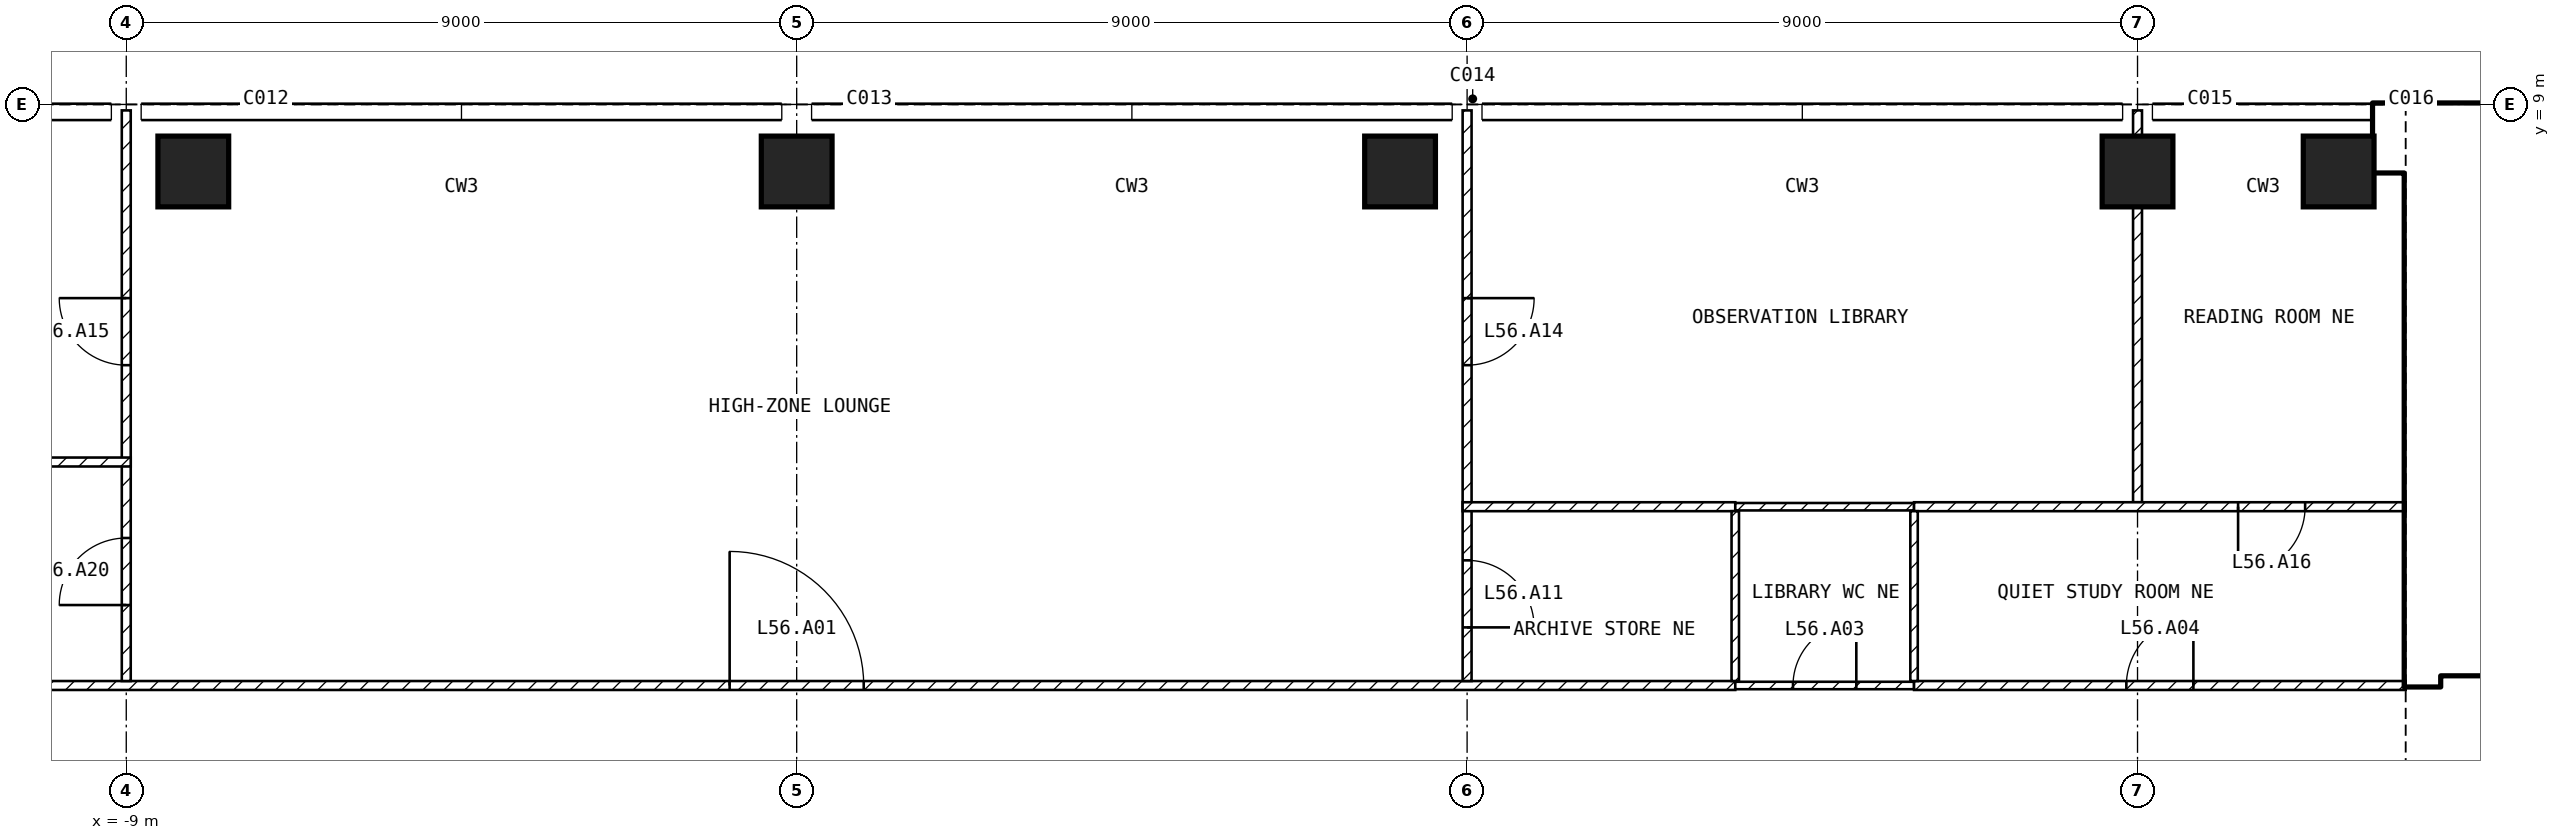
"""IFC4 building model, lengths in metres.
Left out: names, types, materials, properties, quantities, classifications, styles, units other than length and angle.
Written with IfcOpenShell. Run it as: python <this file> out.ifc"""

import sys

from ifc_helpers import new_model, si_unit, direction, frame, frame_2d, origin, origin_2d, place, context, subcontext, project, spatial, rectangle, extrude, element, fill, save


model = new_model("IFC4")
c1 = context("Model", 3, precision=1e-05, world=origin(), true_north=direction((0.0, 1.0)))
c2 = subcontext(c1, "Body", "Model", "MODEL_VIEW")
j1 = project(units=[si_unit("LENGTHUNIT", "METRE"), si_unit("PLANEANGLEUNIT", "RADIAN")], contexts=[c1])
p1 = place(None, origin())
s1 = spatial("IfcSite", under=j1, at=p1, CompositionType="ELEMENT")
p2 = place(p1, origin())
s2 = spatial("IfcBuilding", under=s1, at=p2, CompositionType="ELEMENT")
p3 = place(p2, frame((0.0, 0.0, 222.6)))
s3 = spatial("IfcBuildingStorey", under=s2, at=p3, CompositionType="ELEMENT", Elevation=222.6)
for number, where, z_axis, x_axis in (
    (1, (-8.1, 8.1, -0.3), (0.0, 0.0, 1.0), (1.0, 0.0, 0.0)),
    (2, (0.0, 8.1, -0.3), (0.0, 0.0, 1.0), (1.0, 0.0, 0.0)),
    (3, (8.1, 8.1, -0.3), (0.0, 0.0, 1.0), (1.0, 0.0, 0.0)),
    (4, (18.0, 8.1, -0.3), (0.0, 0.0, 1.0), (1.0, 0.0, 0.0)),
    (5, (20.7, 8.1, -0.3), (0.0, 0.0, 1.0), (1.0, 0.0, 0.0)),
):
    element("IfcColumn", number, at=place(p3, frame(where, z_axis=z_axis, x_axis=x_axis)), inside=s3, PredefinedType="COLUMN", context=c2, shape_type="SweptSolid", body=[
        extrude(rectangle(XDim=0.95, YDim=0.95, at=origin_2d()), origin(), (0.0, 0.0, 1.0), 5.25),
    ])
p4 = place(p3, frame((21.175, 8.55, 0.0), z_axis=(0.0, 0.0, 1.0), x_axis=(1.0, 0.0, 0.0)))
e6 = element("IfcWall", 6, at=p4, inside=s3, PredefinedType="SHEAR", context=c2, shape_type="SweptSolid", body=[
    extrude(rectangle(XDim=8.425, YDim=0.9, at=frame_2d((4.212, 0.0))), origin(), (0.0, 0.0, 1.0), 4.95),
])
p5 = place(p3, frame((21.825, 1.2, 0.0), z_axis=(0.0, 0.0, 1.0), x_axis=(0.0, 1.0, 0.0)))
e7 = element("IfcWall", 7, at=p5, inside=s3, PredefinedType="SHEAR", context=c2, shape_type="SweptSolid", body=[
    extrude(rectangle(XDim=6.9, YDim=0.45, at=frame_2d((3.45, 0.0))), origin(), (0.0, 0.0, 1.0), 4.95),
])
p6 = place(p3, frame((22.05, 1.45, 0.0), z_axis=(0.0, 0.0, 1.0), x_axis=(1.0, 0.0, 0.0)))
e8 = element("IfcWall", 8, at=p6, inside=s3, PredefinedType="SOLIDWALL", context=c2, shape_type="SweptSolid", body=[
    extrude(rectangle(XDim=11.15, YDim=0.2, at=frame_2d((5.575, 0.0))), origin(), (0.0, 0.0, 1.0), 4.95),
])
p7 = place(p6, frame((0.75, 0.0, 0.0)))
e9 = element("IfcOpeningElement", 9, at=p7, cuts=e8, PredefinedType="OPENING", context=c2, shape_type="SweptSolid", body=[
    extrude(rectangle(XDim=1.0, YDim=2.1, at=frame_2d((0.5, 1.05))), frame((0.0, 0.11, 0.0), z_axis=(0.0, -1.0, 0.0), x_axis=(1.0, 0.0, 0.0)), (0.0, 0.0, 1.0), 0.22),
])
p8 = place(p6, frame((3.25, 0.0, 0.0)))
e10 = element("IfcOpeningElement", 10, at=p8, cuts=e8, PredefinedType="OPENING", context=c2, shape_type="SweptSolid", body=[
    extrude(rectangle(XDim=1.0, YDim=2.1, at=frame_2d((0.5, 1.05))), frame((0.0, 0.11, 0.0), z_axis=(0.0, -1.0, 0.0), x_axis=(1.0, 0.0, 0.0)), (0.0, 0.0, 1.0), 0.22),
])
p9 = place(p6, frame((9.15, 0.0, 0.0)))
e11 = element("IfcOpeningElement", 11, at=p9, cuts=e8, PredefinedType="OPENING", context=c2, shape_type="SweptSolid", body=[
    extrude(rectangle(XDim=0.9, YDim=2.1, at=frame_2d((0.45, 1.05))), frame((0.0, 0.11, 0.0), z_axis=(0.0, -1.0, 0.0), x_axis=(1.0, 0.0, 0.0)), (0.0, 0.0, 1.0), 0.22),
])
p10 = place(p3, frame((22.05, 5.15, 0.0), z_axis=(0.0, 0.0, 1.0), x_axis=(1.0, 0.0, 0.0)))
e12 = element("IfcWall", 12, at=p10, inside=s3, PredefinedType="SOLIDWALL", context=c2, shape_type="SweptSolid", body=[
    extrude(rectangle(XDim=6.3, YDim=0.2, at=frame_2d((3.15, 0.0))), origin(), (0.0, 0.0, 1.0), 4.95),
])
p11 = place(p10, frame((0.2, 0.0, 0.0)))
e13 = element("IfcOpeningElement", 13, at=p11, cuts=e12, PredefinedType="OPENING", context=c2, shape_type="SweptSolid", body=[
    extrude(rectangle(XDim=1.0, YDim=2.1, at=frame_2d((0.5, 1.05))), frame((0.0, 0.11, 0.0), z_axis=(0.0, -1.0, 0.0), x_axis=(1.0, 0.0, 0.0)), (0.0, 0.0, 1.0), 0.22),
])
p12 = place(p3, frame((-18.0, 1.2, 0.0), z_axis=(0.0, 0.0, 1.0), x_axis=(1.0, 0.0, 0.0)))
e14 = element("IfcWall", 14, at=p12, inside=s3, PredefinedType="PARTITIONING", context=c2, shape_type="SweptSolid", body=[
    extrude(rectangle(XDim=30.6, YDim=0.12, at=frame_2d((15.3, 0.0))), origin(), (0.0, 0.0, 1.0), 4.95),
])
p13 = place(p12, frame((17.1, 0.0, 0.0)))
e15 = element("IfcOpeningElement", 15, at=p13, cuts=e14, PredefinedType="OPENING", context=c2, shape_type="SweptSolid", body=[
    extrude(rectangle(XDim=1.8, YDim=2.1, at=frame_2d((0.9, 1.05))), frame((0.0, 0.07, 0.0), z_axis=(0.0, -1.0, 0.0), x_axis=(1.0, 0.0, 0.0)), (0.0, 0.0, 1.0), 0.14),
])
p14 = place(p12, frame((1.35, 0.0, 0.0)))
e16 = element("IfcOpeningElement", 16, at=p14, cuts=e14, PredefinedType="OPENING", context=c2, shape_type="SweptSolid", body=[
    extrude(rectangle(XDim=0.9, YDim=2.1, at=frame_2d((0.45, 1.05))), frame((0.0, 0.07, 0.0), z_axis=(0.0, -1.0, 0.0), x_axis=(1.0, 0.0, 0.0)), (0.0, 0.0, 1.0), 0.14),
])
p15 = place(p3, frame((12.6, 1.2, 0.0), z_axis=(0.0, 0.0, 1.0), x_axis=(1.0, 0.0, 0.0)))
e17 = element("IfcWall", 17, at=p15, inside=s3, PredefinedType="PARTITIONING", context=c2, shape_type="SweptSolid", body=[
    extrude(rectangle(XDim=2.4, YDim=0.1, at=frame_2d((1.2, 0.0))), origin(), (0.0, 0.0, 1.0), 4.95),
])
p16 = place(p15, frame((0.775, 0.0, 0.0)))
e18 = element("IfcOpeningElement", 18, at=p16, cuts=e17, PredefinedType="OPENING", context=c2, shape_type="SweptSolid", body=[
    extrude(rectangle(XDim=0.85, YDim=2.1, at=frame_2d((0.425, 1.05))), frame((0.0, 0.06, 0.0), z_axis=(0.0, -1.0, 0.0), x_axis=(1.0, 0.0, 0.0)), (0.0, 0.0, 1.0), 0.12),
])
p17 = place(p3, frame((15.0, 1.2, 0.0), z_axis=(0.0, 0.0, 1.0), x_axis=(1.0, 0.0, 0.0)))
e19 = element("IfcWall", 19, at=p17, inside=s3, PredefinedType="PARTITIONING", context=c2, shape_type="SweptSolid", body=[
    extrude(rectangle(XDim=6.6, YDim=0.12, at=frame_2d((3.3, 0.0))), origin(), (0.0, 0.0, 1.0), 4.95),
])
p18 = place(p17, frame((2.85, 0.0, 0.0)))
e20 = element("IfcOpeningElement", 20, at=p18, cuts=e19, PredefinedType="OPENING", context=c2, shape_type="SweptSolid", body=[
    extrude(rectangle(XDim=0.9, YDim=2.1, at=frame_2d((0.45, 1.05))), frame((0.0, 0.07, 0.0), z_axis=(0.0, -1.0, 0.0), x_axis=(1.0, 0.0, 0.0)), (0.0, 0.0, 1.0), 0.14),
])
p19 = place(p3, frame((9.0, 8.92, 0.0), z_axis=(0.0, 0.0, 1.0), x_axis=(0.0, -1.0, 0.0)))
e21 = element("IfcWall", 21, at=p19, inside=s3, PredefinedType="PARTITIONING", context=c2, shape_type="SweptSolid", body=[
    extrude(rectangle(XDim=7.66, YDim=0.12, at=frame_2d((3.83, 0.0))), origin(), (0.0, 0.0, 1.0), 4.95),
])
p20 = place(p19, frame((6.04, 0.0, 0.0)))
e22 = element("IfcOpeningElement", 22, at=p20, cuts=e21, PredefinedType="OPENING", context=c2, shape_type="SweptSolid", body=[
    extrude(rectangle(XDim=0.9, YDim=2.1, at=frame_2d((0.45, 1.05))), frame((0.0, 0.07, 0.0), z_axis=(0.0, -1.0, 0.0), x_axis=(1.0, 0.0, 0.0)), (0.0, 0.0, 1.0), 0.14),
])
p21 = place(p19, frame((2.52, 0.0, 0.0)))
e23 = element("IfcOpeningElement", 23, at=p21, cuts=e21, PredefinedType="OPENING", context=c2, shape_type="SweptSolid", body=[
    extrude(rectangle(XDim=0.9, YDim=2.1, at=frame_2d((0.45, 1.05))), frame((0.0, 0.07, 0.0), z_axis=(0.0, -1.0, 0.0), x_axis=(1.0, 0.0, 0.0)), (0.0, 0.0, 1.0), 0.14),
])
p22 = place(p3, frame((-9.0, 1.26, 0.0), z_axis=(0.0, 0.0, 1.0), x_axis=(0.0, 1.0, 0.0)))
e24 = element("IfcWall", 24, at=p22, inside=s3, PredefinedType="PARTITIONING", context=c2, shape_type="SweptSolid", body=[
    extrude(rectangle(XDim=7.66, YDim=0.12, at=frame_2d((3.83, 0.0))), origin(), (0.0, 0.0, 1.0), 4.95),
])
p23 = place(p22, frame((4.24, 0.0, 0.0)))
e25 = element("IfcOpeningElement", 25, at=p23, cuts=e24, PredefinedType="OPENING", context=c2, shape_type="SweptSolid", body=[
    extrude(rectangle(XDim=0.9, YDim=2.1, at=frame_2d((0.45, 1.05))), frame((0.0, 0.07, 0.0), z_axis=(0.0, -1.0, 0.0), x_axis=(1.0, 0.0, 0.0)), (0.0, 0.0, 1.0), 0.14),
])
p24 = place(p22, frame((1.02, 0.0, 0.0)))
e26 = element("IfcOpeningElement", 26, at=p24, cuts=e24, PredefinedType="OPENING", context=c2, shape_type="SweptSolid", body=[
    extrude(rectangle(XDim=0.9, YDim=2.1, at=frame_2d((0.45, 1.05))), frame((0.0, 0.07, 0.0), z_axis=(0.0, -1.0, 0.0), x_axis=(1.0, 0.0, 0.0)), (0.0, 0.0, 1.0), 0.14),
])
p25 = place(p3, frame((18.0, 8.92, 0.0), z_axis=(0.0, 0.0, 1.0), x_axis=(0.0, -1.0, 0.0)))
e27 = element("IfcWall", 27, at=p25, inside=s3, PredefinedType="PARTITIONING", context=c2, shape_type="SweptSolid", body=[
    extrude(rectangle(XDim=5.26, YDim=0.12, at=frame_2d((2.63, 0.0))), origin(), (0.0, 0.0, 1.0), 4.18),
])
p26 = place(p3, frame((12.6, 3.6, 0.0), z_axis=(0.0, 0.0, 1.0), x_axis=(-1.0, 0.0, 0.0)))
e28 = element("IfcWall", 28, at=p26, inside=s3, PredefinedType="PARTITIONING", context=c2, shape_type="SweptSolid", body=[
    extrude(rectangle(XDim=3.66, YDim=0.12, at=frame_2d((1.83, 0.0))), origin(), (0.0, 0.0, 1.0), 4.95),
])
p27 = place(p3, frame((15.0, 3.6, 0.0), z_axis=(0.0, 0.0, 1.0), x_axis=(-1.0, 0.0, 0.0)))
e29 = element("IfcWall", 29, at=p27, inside=s3, PredefinedType="PARTITIONING", context=c2, shape_type="SweptSolid", body=[
    extrude(rectangle(XDim=2.4, YDim=0.1, at=frame_2d((1.2, 0.0))), origin(), (0.0, 0.0, 1.0), 4.95),
])
p28 = place(p3, frame((21.6, 3.6, 0.0), z_axis=(0.0, 0.0, 1.0), x_axis=(-1.0, 0.0, 0.0)))
e30 = element("IfcWall", 30, at=p28, inside=s3, PredefinedType="PARTITIONING", context=c2, shape_type="SweptSolid", body=[
    extrude(rectangle(XDim=6.6, YDim=0.12, at=frame_2d((3.3, 0.0))), origin(), (0.0, 0.0, 1.0), 4.95),
])
p29 = place(p28, frame((1.35, 0.0, 0.0)))
e31 = element("IfcOpeningElement", 31, at=p29, cuts=e30, PredefinedType="OPENING", context=c2, shape_type="SweptSolid", body=[
    extrude(rectangle(XDim=0.9, YDim=2.1, at=frame_2d((0.45, 1.05))), frame((0.0, 0.07, 0.0), z_axis=(0.0, -1.0, 0.0), x_axis=(1.0, 0.0, 0.0)), (0.0, 0.0, 1.0), 0.14),
])
for number, where, z_axis, x_axis in (
    (32, (12.6, 3.54, 0.0), (0.0, 0.0, 1.0), (0.0, -1.0, 0.0)),
    (33, (15.0, 3.54, 0.0), (0.0, 0.0, 1.0), (0.0, -1.0, 0.0)),
):
    element("IfcWall", number, at=place(p3, frame(where, z_axis=z_axis, x_axis=x_axis)), inside=s3, PredefinedType="PARTITIONING", context=c2, shape_type="SweptSolid", body=[
        extrude(rectangle(XDim=2.28, YDim=0.1, at=frame_2d((1.14, 0.0))), origin(), (0.0, 0.0, 1.0), 4.95),
    ])
p30 = place(p3, frame((-8.94, 4.2, 0.0), z_axis=(0.0, 0.0, 1.0), x_axis=(-1.0, 0.0, 0.0)))
e34 = element("IfcWall", 34, at=p30, inside=s3, PredefinedType="PARTITIONING", context=c2, shape_type="SweptSolid", body=[
    extrude(rectangle(XDim=9.06, YDim=0.12, at=frame_2d((4.53, 0.0))), origin(), (0.0, 0.0, 1.0), 4.95),
])
p31 = place(p11, origin())
e35 = element("IfcDoor", 35, at=p31, inside=s3, OperationType="SINGLE_SWING_LEFT", PredefinedType="DOOR", context=c2, shape_type="SweptSolid", body=[
    extrude(rectangle(XDim=1.0, YDim=2.1, at=frame_2d((0.5, 1.05))), frame((0.0, 0.025, 0.0), z_axis=(0.0, -1.0, 0.0), x_axis=(1.0, 0.0, 0.0)), (0.0, 0.0, 1.0), 0.05),
])
fill(e13, e35)
p32 = place(p13, origin())
e36 = element("IfcDoor", 36, at=p32, inside=s3, OperationType="SINGLE_SWING_LEFT", PredefinedType="DOOR", context=c2, shape_type="SweptSolid", body=[
    extrude(rectangle(XDim=1.8, YDim=2.1, at=frame_2d((0.9, 1.05))), frame((0.0, 0.025, 0.0), z_axis=(0.0, -1.0, 0.0), x_axis=(1.0, 0.0, 0.0)), (0.0, 0.0, 1.0), 0.05),
])
fill(e15, e36)
p33 = place(p16, origin())
e37 = element("IfcDoor", 37, at=p33, inside=s3, OperationType="SINGLE_SWING_RIGHT", PredefinedType="DOOR", context=c2, shape_type="SweptSolid", body=[
    extrude(rectangle(XDim=0.85, YDim=2.1, at=frame_2d((0.425, 1.05))), frame((0.0, 0.025, 0.0), z_axis=(0.0, -1.0, 0.0), x_axis=(1.0, 0.0, 0.0)), (0.0, 0.0, 1.0), 0.05),
])
fill(e18, e37)
p34 = place(p18, origin())
e38 = element("IfcDoor", 38, at=p34, inside=s3, OperationType="SINGLE_SWING_RIGHT", PredefinedType="DOOR", context=c2, shape_type="SweptSolid", body=[
    extrude(rectangle(XDim=0.9, YDim=2.1, at=frame_2d((0.45, 1.05))), frame((0.0, 0.025, 0.0), z_axis=(0.0, -1.0, 0.0), x_axis=(1.0, 0.0, 0.0)), (0.0, 0.0, 1.0), 0.05),
])
fill(e20, e38)
p35 = place(p20, origin())
e39 = element("IfcDoor", 39, at=p35, inside=s3, OperationType="SINGLE_SWING_RIGHT", PredefinedType="DOOR", context=c2, shape_type="SweptSolid", body=[
    extrude(rectangle(XDim=0.9, YDim=2.1, at=frame_2d((0.45, 1.05))), frame((0.0, 0.025, 0.0), z_axis=(0.0, -1.0, 0.0), x_axis=(1.0, 0.0, 0.0)), (0.0, 0.0, 1.0), 0.05),
])
fill(e22, e39)
p36 = place(p21, origin())
e40 = element("IfcDoor", 40, at=p36, inside=s3, OperationType="SINGLE_SWING_LEFT", PredefinedType="DOOR", context=c2, shape_type="SweptSolid", body=[
    extrude(rectangle(XDim=0.9, YDim=2.1, at=frame_2d((0.45, 1.05))), frame((0.0, 0.025, 0.0), z_axis=(0.0, -1.0, 0.0), x_axis=(1.0, 0.0, 0.0)), (0.0, 0.0, 1.0), 0.05),
])
fill(e23, e40)
p37 = place(p23, origin())
e41 = element("IfcDoor", 41, at=p37, inside=s3, OperationType="SINGLE_SWING_RIGHT", PredefinedType="DOOR", context=c2, shape_type="SweptSolid", body=[
    extrude(rectangle(XDim=0.9, YDim=2.1, at=frame_2d((0.45, 1.05))), frame((0.0, 0.025, 0.0), z_axis=(0.0, -1.0, 0.0), x_axis=(1.0, 0.0, 0.0)), (0.0, 0.0, 1.0), 0.05),
])
fill(e25, e41)
p38 = place(p29, origin())
e42 = element("IfcDoor", 42, at=p38, inside=s3, OperationType="SINGLE_SWING_RIGHT", PredefinedType="DOOR", context=c2, shape_type="SweptSolid", body=[
    extrude(rectangle(XDim=0.9, YDim=2.1, at=frame_2d((0.45, 1.05))), frame((0.0, 0.025, 0.0), z_axis=(0.0, -1.0, 0.0), x_axis=(1.0, 0.0, 0.0)), (0.0, 0.0, 1.0), 0.05),
])
fill(e31, e42)
p39 = place(p24, origin())
e43 = element("IfcDoor", 43, at=p39, inside=s3, OperationType="SINGLE_SWING_LEFT", PredefinedType="DOOR", context=c2, shape_type="SweptSolid", body=[
    extrude(rectangle(XDim=0.9, YDim=2.1, at=frame_2d((0.45, 1.05))), frame((0.0, 0.025, 0.0), z_axis=(0.0, -1.0, 0.0), x_axis=(1.0, 0.0, 0.0)), (0.0, 0.0, 1.0), 0.05),
])
fill(e26, e43)
save(model, sys.argv[1])
